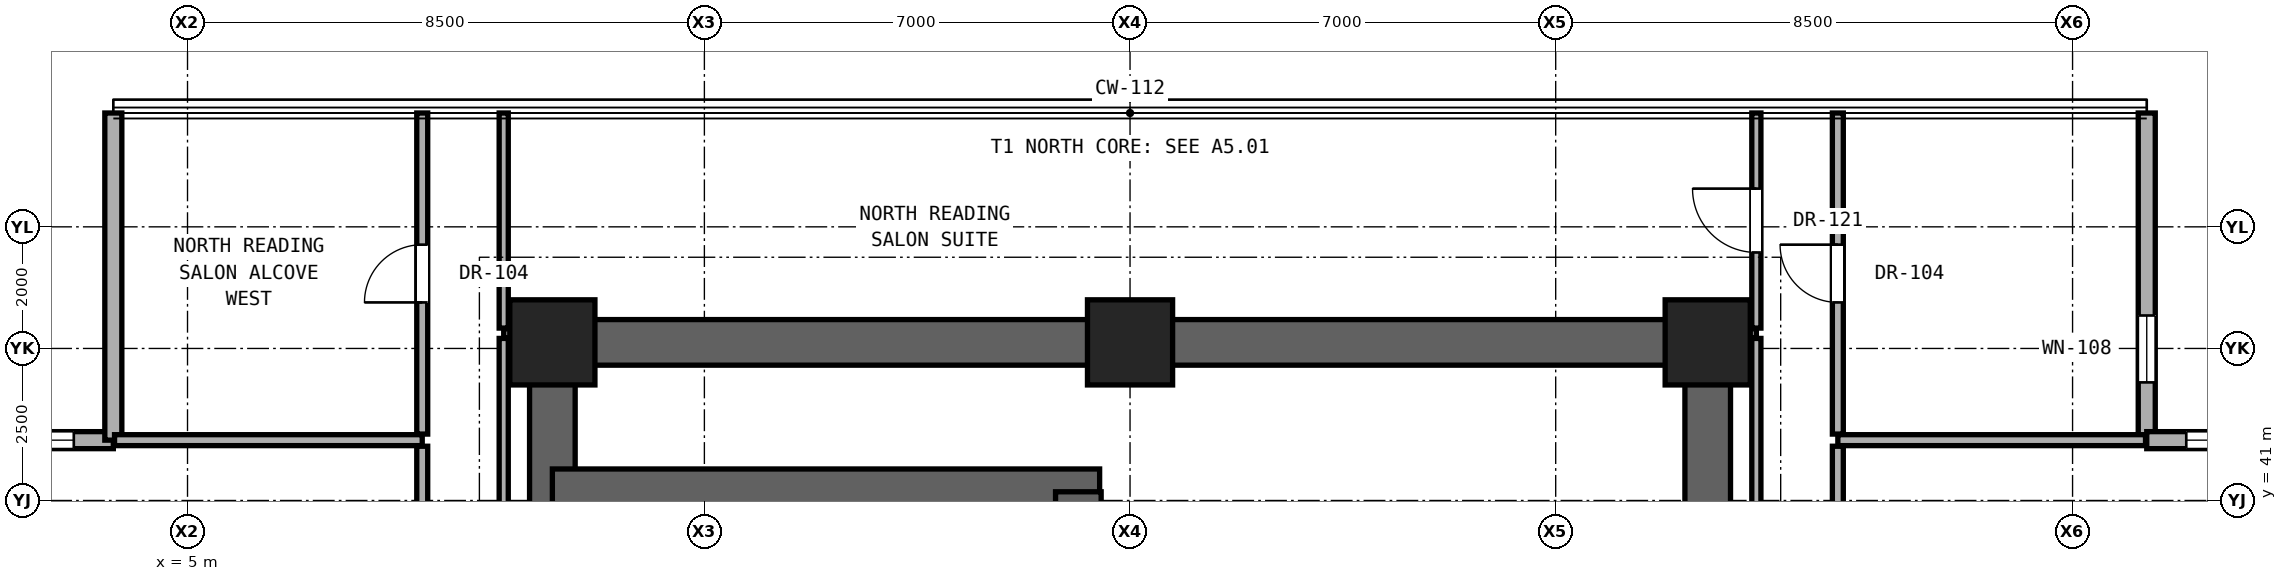
"""IFC4 building model, lengths in metres.
Left out: names, types, materials, properties, quantities, classifications, styles, units other than length and angle.
Written with IfcOpenShell. Run it as: python <this file> out.ifc"""

import sys

from ifc_helpers import new_model, si_unit, direction, frame, frame_2d, origin, origin_2d, place, context, subcontext, project, spatial, rectangle, extrude, element, fill, save


model = new_model("IFC4")
c1 = context("Model", 3, precision=1e-05, world=origin(), true_north=direction((0.0, 1.0)))
c2 = subcontext(c1, "Body", "Model", "MODEL_VIEW")
j1 = project(units=[si_unit("LENGTHUNIT", "METRE"), si_unit("PLANEANGLEUNIT", "RADIAN")], contexts=[c1])
p1 = place(None, origin())
s1 = spatial("IfcSite", under=j1, at=p1, CompositionType="ELEMENT")
p2 = place(p1, origin())
s2 = spatial("IfcBuilding", under=s1, at=p2, CompositionType="ELEMENT")
p3 = place(p2, frame((0.0, 0.0, 35.6)))
s3 = spatial("IfcBuildingStorey", under=s2, at=p3, CompositionType="ELEMENT", Elevation=35.6)
for number, where, z_axis, x_axis in (
    (1, (11.0, 43.6, 0.0), (0.0, 0.0, 1.0), (1.0, 0.0, 0.0)),
    (2, (20.5, 43.6, 0.0), (0.0, 0.0, 1.0), (1.0, 0.0, 0.0)),
    (3, (30.0, 43.6, 0.0), (0.0, 0.0, 1.0), (1.0, 0.0, 0.0)),
):
    element("IfcColumn", number, at=place(p3, frame(where, z_axis=z_axis, x_axis=x_axis)), inside=s3, PredefinedType="COLUMN", context=c2, shape_type="SweptSolid", body=[
        extrude(rectangle(XDim=1.4, YDim=1.4, at=origin_2d()), origin(), (0.0, 0.0, 1.0), 3.3),
    ])
p4 = place(p3, frame((11.0, 43.6, 0.0), z_axis=(0.0, 0.0, 1.0), x_axis=(1.0, 0.0, 0.0)))
e4 = element("IfcWall", 4, at=p4, inside=s3, PredefinedType="SHEAR", context=c2, shape_type="SweptSolid", body=[
    extrude(rectangle(XDim=19.0, YDim=0.75, at=frame_2d((9.5, 0.0))), origin(), (0.0, 0.0, 1.0), 3.06),
])
for number, where, z_axis, x_axis in (
    (5, (11.0, 37.6, 0.0), (0.0, 0.0, 1.0), (0.0, 1.0, 0.0)),
    (6, (30.0, 37.6, 0.0), (0.0, 0.0, 1.0), (0.0, 1.0, 0.0)),
):
    element("IfcWall", number, at=place(p3, frame(where, z_axis=z_axis, x_axis=x_axis)), inside=s3, PredefinedType="SHEAR", context=c2, shape_type="SweptSolid", body=[
        extrude(rectangle(XDim=6.0, YDim=0.75, at=frame_2d((3.0, 0.0))), origin(), (0.0, 0.0, 1.0), 3.06),
    ])
p5 = place(p3, frame((11.0, 41.143, 0.0), z_axis=(0.0, 0.0, 1.0), x_axis=(1.0, 0.0, 0.0)))
e7 = element("IfcWall", 7, at=p5, inside=s3, PredefinedType="SHEAR", context=c2, shape_type="SweptSolid", body=[
    extrude(rectangle(XDim=9.0, YDim=0.75, at=frame_2d((4.5, 0.0))), origin(), (0.0, 0.0, 1.0), 3.06),
])
p6 = place(p3, frame((19.65, 37.6, 0.0), z_axis=(0.0, 0.0, 1.0), x_axis=(0.0, 1.0, 0.0)))
e8 = element("IfcWall", 8, at=p6, inside=s3, PredefinedType="SHEAR", context=c2, shape_type="SweptSolid", body=[
    extrude(rectangle(XDim=3.543, YDim=0.75, at=frame_2d((1.771, 0.0))), origin(), (0.0, 0.0, 1.0), 3.06),
])
p7 = place(p3, frame((37.22, 41.992, 0.0), z_axis=(0.0, 0.0, 1.0), x_axis=(0.0, 1.0, 0.0)))
e9 = element("IfcWall", 9, at=p7, inside=s3, PredefinedType="SOLIDWALL", context=c2, shape_type="SweptSolid", body=[
    extrude(rectangle(XDim=5.38, YDim=0.28, at=frame_2d((2.69, 0.0))), origin(), (0.0, 0.0, 1.0), 3.04),
])
p8 = place(p7, frame((0.95, 0.0, 0.85)))
e10 = element("IfcOpeningElement", 10, at=p8, cuts=e9, PredefinedType="OPENING", context=c2, shape_type="SweptSolid", body=[
    extrude(rectangle(XDim=1.1, YDim=2.0, at=frame_2d((0.55, 1.0))), frame((0.0, 0.15, 0.0), z_axis=(0.0, -1.0, 0.0), x_axis=(1.0, 0.0, 0.0)), (0.0, 0.0, 1.0), 0.3),
])
p9 = place(p3, frame((3.78, 41.992, 0.0), z_axis=(0.0, 0.0, 1.0), x_axis=(-1.0, 0.0, 0.0)))
e11 = element("IfcWall", 11, at=p9, inside=s3, PredefinedType="SOLIDWALL", context=c2, shape_type="SweptSolid", body=[
    extrude(rectangle(XDim=5.38, YDim=0.28, at=frame_2d((2.69, 0.0))), origin(), (0.0, 0.0, 1.0), 3.04),
])
p10 = place(p9, frame((0.65, 0.0, 0.85)))
e12 = element("IfcOpeningElement", 12, at=p10, cuts=e11, PredefinedType="OPENING", context=c2, shape_type="SweptSolid", body=[
    extrude(rectangle(XDim=1.1, YDim=2.0, at=frame_2d((0.55, 1.0))), frame((0.0, 0.15, 0.0), z_axis=(0.0, -1.0, 0.0), x_axis=(1.0, 0.0, 0.0)), (0.0, 0.0, 1.0), 0.3),
])
p11 = place(p3, frame((3.78, 47.372, 0.0), z_axis=(0.0, 0.0, 1.0), x_axis=(0.0, -1.0, 0.0)))
e13 = element("IfcWall", 13, at=p11, inside=s3, PredefinedType="SOLIDWALL", context=c2, shape_type="SweptSolid", body=[
    extrude(rectangle(XDim=5.38, YDim=0.28, at=frame_2d((2.69, 0.0))), origin(), (0.0, 0.0, 1.0), 3.04),
])
p12 = place(p3, frame((42.6, 41.992, 0.0), z_axis=(0.0, 0.0, 1.0), x_axis=(-1.0, 0.0, 0.0)))
e14 = element("IfcWall", 14, at=p12, inside=s3, PredefinedType="SOLIDWALL", context=c2, shape_type="SweptSolid", body=[
    extrude(rectangle(XDim=5.38, YDim=0.28, at=frame_2d((2.69, 0.0))), origin(), (0.0, 0.0, 1.0), 3.04),
])
p13 = place(p12, frame((3.63, 0.0, 0.85)))
e15 = element("IfcOpeningElement", 15, at=p13, cuts=e14, PredefinedType="OPENING", context=c2, shape_type="SweptSolid", body=[
    extrude(rectangle(XDim=1.1, YDim=2.0, at=frame_2d((0.55, 1.0))), frame((0.0, 0.15, 0.0), z_axis=(0.0, -1.0, 0.0), x_axis=(1.0, 0.0, 0.0)), (0.0, 0.0, 1.0), 0.3),
])
for number, where, z_axis, x_axis in (
    (16, (3.8, 41.992, 0.0), (0.0, 0.0, 1.0), (1.0, 0.0, 0.0)),
    (17, (32.14, 41.992, 0.0), (0.0, 0.0, 1.0), (1.0, 0.0, 0.0)),
):
    element("IfcWall", number, at=place(p3, frame(where, z_axis=z_axis, x_axis=x_axis)), inside=s3, PredefinedType="PARTITIONING", context=c2, shape_type="SweptSolid", body=[
        extrude(rectangle(XDim=5.06, YDim=0.18, at=frame_2d((2.53, 0.0))), origin(), (0.0, 0.0, 1.0), 3.06),
    ])
for number, where, z_axis, x_axis in (
    (18, (10.2, 43.75, 0.0), (0.0, 0.0, 1.0), (1.0, 0.0, 0.0)),
    (19, (30.37, 43.75, 0.0), (0.0, 0.0, 1.0), (1.0, 0.0, 0.0)),
):
    element("IfcWall", number, at=place(p3, frame(where, z_axis=z_axis, x_axis=x_axis)), inside=s3, PredefinedType="PARTITIONING", context=c2, shape_type="SweptSolid", body=[
        extrude(rectangle(XDim=0.43, YDim=0.15, at=frame_2d((0.215, 0.0))), origin(), (0.0, 0.0, 1.0), 3.06),
    ])
p14 = place(p3, frame((8.86, 33.6, 0.0), z_axis=(0.0, 0.0, 1.0), x_axis=(0.0, 1.0, 0.0)))
e20 = element("IfcWall", 20, at=p14, inside=s3, PredefinedType="PARTITIONING", context=c2, shape_type="SweptSolid", body=[
    extrude(rectangle(XDim=8.292, YDim=0.18, at=frame_2d((4.146, 0.0))), origin(), (0.0, 0.0, 1.0), 2.436),
])
p15 = place(p14, frame((3.621, 0.0, 0.0)))
e21 = element("IfcOpeningElement", 21, at=p15, cuts=e20, PredefinedType="OPENING", context=c2, shape_type="SweptSolid", body=[
    extrude(rectangle(XDim=1.05, YDim=2.2, at=frame_2d((0.525, 1.1))), frame((0.0, 0.1, 0.0), z_axis=(0.0, -1.0, 0.0), x_axis=(1.0, 0.0, 0.0)), (0.0, 0.0, 1.0), 0.2),
])
p16 = place(p3, frame((8.86, 42.092, 0.0), z_axis=(0.0, 0.0, 1.0), x_axis=(0.0, 1.0, 0.0)))
e22 = element("IfcWall", 22, at=p16, inside=s3, PredefinedType="PARTITIONING", context=c2, shape_type="SweptSolid", body=[
    extrude(rectangle(XDim=5.28, YDim=0.18, at=frame_2d((2.64, 0.0))), origin(), (0.0, 0.0, 1.0), 3.06),
])
p17 = place(p16, frame((2.165, 0.0, 0.0)))
e23 = element("IfcOpeningElement", 23, at=p17, cuts=e22, PredefinedType="OPENING", context=c2, shape_type="SweptSolid", body=[
    extrude(rectangle(XDim=0.95, YDim=2.15, at=frame_2d((0.475, 1.075))), frame((0.0, 0.1, 0.0), z_axis=(0.0, -1.0, 0.0), x_axis=(1.0, 0.0, 0.0)), (0.0, 0.0, 1.0), 0.2),
])
p18 = place(p3, frame((10.2, 34.535, 0.0), z_axis=(0.0, 0.0, 1.0), x_axis=(0.0, 1.0, 0.0)))
e24 = element("IfcWall", 24, at=p18, inside=s3, PredefinedType="PARTITIONING", context=c2, shape_type="SweptSolid", body=[
    extrude(rectangle(XDim=9.13, YDim=0.15, at=frame_2d((4.565, 0.0))), origin(), (0.0, 0.0, 1.0), 2.436),
])
p19 = place(p3, frame((10.2, 43.835, 0.0), z_axis=(0.0, 0.0, 1.0), x_axis=(0.0, 1.0, 0.0)))
e25 = element("IfcWall", 25, at=p19, inside=s3, PredefinedType="PARTITIONING", context=c2, shape_type="SweptSolid", body=[
    extrude(rectangle(XDim=3.537, YDim=0.15, at=frame_2d((1.769, 0.0))), origin(), (0.0, 0.0, 1.0), 3.06),
])
p20 = place(p3, frame((30.8, 34.57, 0.0), z_axis=(0.0, 0.0, 1.0), x_axis=(0.0, 1.0, 0.0)))
e26 = element("IfcWall", 26, at=p20, inside=s3, PredefinedType="PARTITIONING", context=c2, shape_type="SweptSolid", body=[
    extrude(rectangle(XDim=9.095, YDim=0.15, at=frame_2d((4.547, 0.0))), origin(), (0.0, 0.0, 1.0), 2.436),
])
p21 = place(p3, frame((30.8, 43.835, 0.0), z_axis=(0.0, 0.0, 1.0), x_axis=(0.0, 1.0, 0.0)))
e27 = element("IfcWall", 27, at=p21, inside=s3, PredefinedType="PARTITIONING", context=c2, shape_type="SweptSolid", body=[
    extrude(rectangle(XDim=3.537, YDim=0.15, at=frame_2d((1.769, 0.0))), origin(), (0.0, 0.0, 1.0), 3.06),
])
p22 = place(p21, frame((1.243, 0.0, 0.0)))
e28 = element("IfcOpeningElement", 28, at=p22, cuts=e27, PredefinedType="OPENING", context=c2, shape_type="SweptSolid", body=[
    extrude(rectangle(XDim=1.05, YDim=2.2, at=frame_2d((0.525, 1.1))), frame((0.0, 0.085, 0.0), z_axis=(0.0, -1.0, 0.0), x_axis=(1.0, 0.0, 0.0)), (0.0, 0.0, 1.0), 0.17),
])
p23 = place(p3, frame((32.14, 32.985, 0.0), z_axis=(0.0, 0.0, 1.0), x_axis=(0.0, 1.0, 0.0)))
e29 = element("IfcWall", 29, at=p23, inside=s3, PredefinedType="PARTITIONING", context=c2, shape_type="SweptSolid", body=[
    extrude(rectangle(XDim=8.907, YDim=0.18, at=frame_2d((4.454, 0.0))), origin(), (0.0, 0.0, 1.0), 2.436),
])
p24 = place(p23, frame((3.928, 0.0, 0.0)))
e30 = element("IfcOpeningElement", 30, at=p24, cuts=e29, PredefinedType="OPENING", context=c2, shape_type="SweptSolid", body=[
    extrude(rectangle(XDim=1.05, YDim=2.2, at=frame_2d((0.525, 1.1))), frame((0.0, 0.1, 0.0), z_axis=(0.0, -1.0, 0.0), x_axis=(1.0, 0.0, 0.0)), (0.0, 0.0, 1.0), 0.2),
])
p25 = place(p3, frame((32.14, 42.092, 0.0), z_axis=(0.0, 0.0, 1.0), x_axis=(0.0, 1.0, 0.0)))
e31 = element("IfcWall", 31, at=p25, inside=s3, PredefinedType="PARTITIONING", context=c2, shape_type="SweptSolid", body=[
    extrude(rectangle(XDim=5.28, YDim=0.18, at=frame_2d((2.64, 0.0))), origin(), (0.0, 0.0, 1.0), 3.06),
])
p26 = place(p25, frame((2.165, 0.0, 0.0)))
e32 = element("IfcOpeningElement", 32, at=p26, cuts=e31, PredefinedType="OPENING", context=c2, shape_type="SweptSolid", body=[
    extrude(rectangle(XDim=0.95, YDim=2.15, at=frame_2d((0.475, 1.075))), frame((0.0, 0.1, 0.0), z_axis=(0.0, -1.0, 0.0), x_axis=(1.0, 0.0, 0.0)), (0.0, 0.0, 1.0), 0.2),
])
p27 = place(p8, origin())
e33 = element("IfcWindow", 33, at=p27, inside=s3, PartitioningType="SINGLE_PANEL", PredefinedType="WINDOW", context=c2, shape_type="SweptSolid", body=[
    extrude(rectangle(XDim=1.1, YDim=2.0, at=frame_2d((0.55, 1.0))), frame((0.0, 0.03, 0.0), z_axis=(0.0, -1.0, 0.0), x_axis=(1.0, 0.0, 0.0)), (0.0, 0.0, 1.0), 0.06),
])
fill(e10, e33)
p28 = place(p10, origin())
e34 = element("IfcWindow", 34, at=p28, inside=s3, PartitioningType="SINGLE_PANEL", PredefinedType="WINDOW", context=c2, shape_type="SweptSolid", body=[
    extrude(rectangle(XDim=1.1, YDim=2.0, at=frame_2d((0.55, 1.0))), frame((0.0, 0.03, 0.0), z_axis=(0.0, -1.0, 0.0), x_axis=(1.0, 0.0, 0.0)), (0.0, 0.0, 1.0), 0.06),
])
fill(e12, e34)
p29 = place(p13, origin())
e35 = element("IfcWindow", 35, at=p29, inside=s3, PartitioningType="SINGLE_PANEL", PredefinedType="WINDOW", context=c2, shape_type="SweptSolid", body=[
    extrude(rectangle(XDim=1.1, YDim=2.0, at=frame_2d((0.55, 1.0))), frame((0.0, 0.03, 0.0), z_axis=(0.0, -1.0, 0.0), x_axis=(1.0, 0.0, 0.0)), (0.0, 0.0, 1.0), 0.06),
])
fill(e15, e35)
p30 = place(p22, origin())
e36 = element("IfcDoor", 36, at=p30, inside=s3, OperationType="SINGLE_SWING_RIGHT", PredefinedType="DOOR", context=c2, shape_type="SweptSolid", body=[
    extrude(rectangle(XDim=1.05, YDim=2.2, at=frame_2d((0.525, 1.1))), frame((0.0, 0.025, 0.0), z_axis=(0.0, -1.0, 0.0), x_axis=(1.0, 0.0, 0.0)), (0.0, 0.0, 1.0), 0.05),
])
fill(e28, e36)
p31 = place(p17, origin())
e37 = element("IfcDoor", 37, at=p31, inside=s3, OperationType="SINGLE_SWING_LEFT", PredefinedType="DOOR", context=c2, shape_type="SweptSolid", body=[
    extrude(rectangle(XDim=0.95, YDim=2.15, at=frame_2d((0.475, 1.075))), frame((0.0, 0.025, 0.0), z_axis=(0.0, -1.0, 0.0), x_axis=(1.0, 0.0, 0.0)), (0.0, 0.0, 1.0), 0.05),
])
fill(e23, e37)
p32 = place(p26, origin())
e38 = element("IfcDoor", 38, at=p32, inside=s3, OperationType="SINGLE_SWING_RIGHT", PredefinedType="DOOR", context=c2, shape_type="SweptSolid", body=[
    extrude(rectangle(XDim=0.95, YDim=2.15, at=frame_2d((0.475, 1.075))), frame((0.0, 0.025, 0.0), z_axis=(0.0, -1.0, 0.0), x_axis=(1.0, 0.0, 0.0)), (0.0, 0.0, 1.0), 0.05),
])
fill(e32, e38)
save(model, sys.argv[1])
